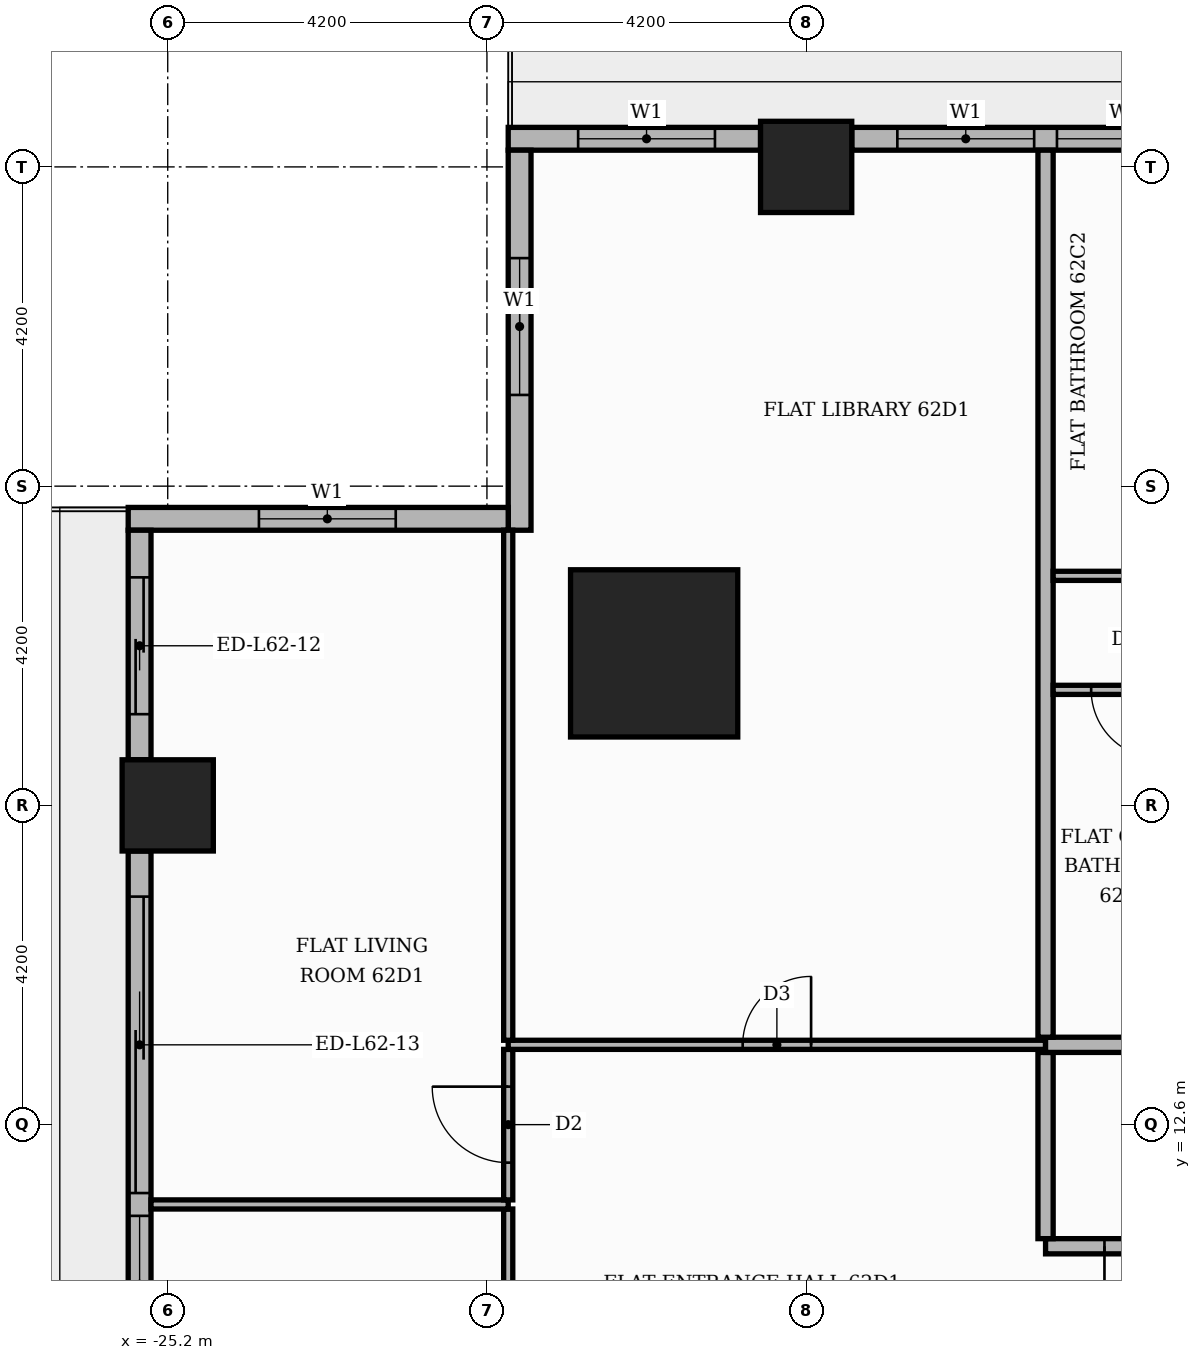
"""IFC4 building model, lengths in metres.
Left out: names, types, materials, properties, quantities, classifications, styles, units other than length and angle.
Written with IfcOpenShell. Run it as: python <this file> out.ifc"""

import sys

from ifc_helpers import new_model, si_unit, direction, frame, frame_2d, origin, origin_2d, place, context, subcontext, project, spatial, rectangle, extrude, element, fill, save


model = new_model("IFC4")
c1 = context("Model", 3, precision=1e-05, world=origin(), true_north=direction((0.0, 1.0)))
c2 = subcontext(c1, "Body", "Model", "MODEL_VIEW")
j1 = project(units=[si_unit("LENGTHUNIT", "METRE"), si_unit("PLANEANGLEUNIT", "RADIAN")], contexts=[c1])
p1 = place(None, origin())
s1 = spatial("IfcSite", under=j1, at=p1, CompositionType="ELEMENT")
p2 = place(p1, origin())
s2 = spatial("IfcBuilding", under=s1, at=p2, CompositionType="ELEMENT")
p3 = place(p2, frame((0.0, 0.0, 260.1)))
s3 = spatial("IfcBuildingStorey", under=s2, at=p3, CompositionType="ELEMENT", Elevation=260.1)
p4 = place(p3, frame((-18.8, 18.8, 0.0), z_axis=(0.0, 0.0, 1.0), x_axis=(1.0, 0.0, 0.0)))
e1 = element("IfcColumn", 1, at=p4, inside=s3, PredefinedType="COLUMN", context=c2, shape_type="SweptSolid", body=[
    extrude(rectangle(XDim=2.2, YDim=2.2, at=origin_2d()), origin(), (0.0, 0.0, 1.0), 3.9),
])
for number, where, z_axis, x_axis in (
    (2, (-16.8, 25.2, 0.0), (0.0, 0.0, 1.0), (1.0, 0.0, 0.0)),
    (3, (-25.2, 16.8, 0.0), (0.0, 0.0, 1.0), (1.0, 0.0, 0.0)),
):
    element("IfcColumn", number, at=place(p3, frame(where, z_axis=z_axis, x_axis=x_axis)), inside=s3, PredefinedType="COLUMN", context=c2, shape_type="SweptSolid", body=[
        extrude(rectangle(XDim=1.2, YDim=1.2, at=origin_2d()), origin(), (0.0, 0.0, 1.0), 3.9),
    ])
p5 = place(p3, frame((-9.0, 25.57, 0.0), z_axis=(0.0, 0.0, 1.0), x_axis=(-1.0, 0.0, 0.0)))
e4 = element("IfcWall", 4, at=p5, inside=s3, PredefinedType="STANDARD", context=c2, shape_type="SweptSolid", body=[
    extrude(rectangle(XDim=7.2, YDim=0.3, at=frame_2d((3.6, 0.0))), origin(), (0.0, 0.0, 1.0), 3.48),
])
p6 = place(p5, frame((0.6, 0.0, 0.9)))
e5 = element("IfcOpeningElement", 5, at=p6, cuts=e4, PredefinedType="OPENING", context=c2, shape_type="SweptSolid", body=[
    extrude(rectangle(XDim=1.8, YDim=2.1, at=frame_2d((0.9, 1.05))), frame((0.0, 0.16, 0.0), z_axis=(0.0, -1.0, 0.0), x_axis=(1.0, 0.0, 0.0)), (0.0, 0.0, 1.0), 0.32),
])
p7 = place(p5, frame((2.7, 0.0, 0.9)))
e6 = element("IfcOpeningElement", 6, at=p7, cuts=e4, PredefinedType="OPENING", context=c2, shape_type="SweptSolid", body=[
    extrude(rectangle(XDim=1.8, YDim=2.1, at=frame_2d((0.9, 1.05))), frame((0.0, 0.16, 0.0), z_axis=(0.0, -1.0, 0.0), x_axis=(1.0, 0.0, 0.0)), (0.0, 0.0, 1.0), 0.32),
])
p8 = place(p5, frame((4.8, 0.0, 0.9)))
e7 = element("IfcOpeningElement", 7, at=p8, cuts=e4, PredefinedType="OPENING", context=c2, shape_type="SweptSolid", body=[
    extrude(rectangle(XDim=1.8, YDim=2.1, at=frame_2d((0.9, 1.05))), frame((0.0, 0.16, 0.0), z_axis=(0.0, -1.0, 0.0), x_axis=(1.0, 0.0, 0.0)), (0.0, 0.0, 1.0), 0.32),
])
p9 = place(p3, frame((-17.4, 25.57, 0.0), z_axis=(0.0, 0.0, 1.0), x_axis=(-1.0, 0.0, 0.0)))
e8 = element("IfcWall", 8, at=p9, inside=s3, PredefinedType="STANDARD", context=c2, shape_type="SweptSolid", body=[
    extrude(rectangle(XDim=3.32, YDim=0.3, at=frame_2d((1.66, 0.0))), origin(), (0.0, 0.0, 1.0), 3.48),
])
p10 = place(p9, frame((0.6, 0.0, 0.9)))
e9 = element("IfcOpeningElement", 9, at=p10, cuts=e8, PredefinedType="OPENING", context=c2, shape_type="SweptSolid", body=[
    extrude(rectangle(XDim=1.8, YDim=2.1, at=frame_2d((0.9, 1.05))), frame((0.0, 0.16, 0.0), z_axis=(0.0, -1.0, 0.0), x_axis=(1.0, 0.0, 0.0)), (0.0, 0.0, 1.0), 0.32),
])
p11 = place(p3, frame((-20.57, 25.42, 0.0), z_axis=(0.0, 0.0, 1.0), x_axis=(0.0, -1.0, 0.0)))
e10 = element("IfcWall", 10, at=p11, inside=s3, PredefinedType="STANDARD", context=c2, shape_type="SweptSolid", body=[
    extrude(rectangle(XDim=5.0, YDim=0.3, at=frame_2d((2.5, 0.0))), origin(), (0.0, 0.0, 1.0), 3.48),
])
p12 = place(p11, frame((1.42, 0.0, 0.9)))
e11 = element("IfcOpeningElement", 11, at=p12, cuts=e10, PredefinedType="OPENING", context=c2, shape_type="SweptSolid", body=[
    extrude(rectangle(XDim=1.8, YDim=2.1, at=frame_2d((0.9, 1.05))), frame((0.0, 0.16, 0.0), z_axis=(0.0, -1.0, 0.0), x_axis=(1.0, 0.0, 0.0)), (0.0, 0.0, 1.0), 0.32),
])
p13 = place(p3, frame((-20.72, 20.57, 0.0), z_axis=(0.0, 0.0, 1.0), x_axis=(-1.0, 0.0, 0.0)))
e12 = element("IfcWall", 12, at=p13, inside=s3, PredefinedType="STANDARD", context=c2, shape_type="SweptSolid", body=[
    extrude(rectangle(XDim=5.0, YDim=0.3, at=frame_2d((2.5, 0.0))), origin(), (0.0, 0.0, 1.0), 3.48),
])
p14 = place(p13, frame((1.48, 0.0, 0.9)))
e13 = element("IfcOpeningElement", 13, at=p14, cuts=e12, PredefinedType="OPENING", context=c2, shape_type="SweptSolid", body=[
    extrude(rectangle(XDim=1.8, YDim=2.1, at=frame_2d((0.9, 1.05))), frame((0.0, 0.16, 0.0), z_axis=(0.0, -1.0, 0.0), x_axis=(1.0, 0.0, 0.0)), (0.0, 0.0, 1.0), 0.32),
])
p15 = place(p3, frame((-25.57, 20.42, 0.0), z_axis=(0.0, 0.0, 1.0), x_axis=(0.0, -1.0, 0.0)))
e14 = element("IfcWall", 14, at=p15, inside=s3, PredefinedType="STANDARD", context=c2, shape_type="SweptSolid", body=[
    extrude(rectangle(XDim=3.02, YDim=0.3, at=frame_2d((1.51, 0.0))), origin(), (0.0, 0.0, 1.0), 3.48),
])
p16 = place(p15, frame((0.62, 0.0, 0.0)))
e15 = element("IfcOpeningElement", 15, at=p16, cuts=e14, PredefinedType="OPENING", context=c2, shape_type="SweptSolid", body=[
    extrude(rectangle(XDim=1.8, YDim=2.4, at=frame_2d((0.9, 1.2))), frame((0.0, 0.16, 0.0), z_axis=(0.0, -1.0, 0.0), x_axis=(1.0, 0.0, 0.0)), (0.0, 0.0, 1.0), 0.32),
])
p17 = place(p3, frame((-25.57, 16.2, 0.0), z_axis=(0.0, 0.0, 1.0), x_axis=(0.0, -1.0, 0.0)))
e16 = element("IfcWall", 16, at=p17, inside=s3, PredefinedType="STANDARD", context=c2, shape_type="SweptSolid", body=[
    extrude(rectangle(XDim=7.2, YDim=0.3, at=frame_2d((3.6, 0.0))), origin(), (0.0, 0.0, 1.0), 3.48),
])
p18 = place(p17, frame((0.6, 0.0, 0.0)))
e17 = element("IfcOpeningElement", 17, at=p18, cuts=e16, PredefinedType="OPENING", context=c2, shape_type="SweptSolid", body=[
    extrude(rectangle(XDim=3.9, YDim=2.4, at=frame_2d((1.95, 1.2))), frame((0.0, 0.16, 0.0), z_axis=(0.0, -1.0, 0.0), x_axis=(1.0, 0.0, 0.0)), (0.0, 0.0, 1.0), 0.32),
])
p19 = place(p17, frame((4.8, 0.0, 0.9)))
e18 = element("IfcOpeningElement", 18, at=p19, cuts=e16, PredefinedType="OPENING", context=c2, shape_type="SweptSolid", body=[
    extrude(rectangle(XDim=1.8, YDim=2.1, at=frame_2d((0.9, 1.05))), frame((0.0, 0.16, 0.0), z_axis=(0.0, -1.0, 0.0), x_axis=(1.0, 0.0, 0.0)), (0.0, 0.0, 1.0), 0.32),
])
p20 = place(p3, frame((-20.72, 7.41, 0.0), z_axis=(0.0, 0.0, 1.0), x_axis=(0.0, 1.0, 0.0)))
e19 = element("IfcWall", 19, at=p20, inside=s3, PredefinedType="PARTITIONING", context=c2, shape_type="SweptSolid", body=[
    extrude(rectangle(XDim=4.08, YDim=0.12, at=frame_2d((2.04, 0.0))), origin(), (0.0, 0.0, 1.0), 3.48),
])
p21 = place(p20, frame((1.59, 0.0, 0.0)))
e20 = element("IfcOpeningElement", 20, at=p21, cuts=e19, PredefinedType="OPENING", context=c2, shape_type="SweptSolid", body=[
    extrude(rectangle(XDim=0.9, YDim=2.1, at=frame_2d((0.45, 1.05))), frame((0.0, 0.07, 0.0), z_axis=(0.0, -1.0, 0.0), x_axis=(1.0, 0.0, 0.0)), (0.0, 0.0, 1.0), 0.14),
])
p22 = place(p3, frame((-13.65, 11.0, 0.0), z_axis=(0.0, 0.0, 1.0), x_axis=(1.0, 0.0, 0.0)))
e21 = element("IfcWall", 21, at=p22, inside=s3, PredefinedType="PARTITIONING", context=c2, shape_type="SweptSolid", body=[
    extrude(rectangle(XDim=2.65, YDim=0.2, at=frame_2d((1.325, 0.0))), origin(), (0.0, 0.0, 1.0), 3.48),
])
p23 = place(p22, frame((0.775, 0.0, 0.0)))
e22 = element("IfcOpeningElement", 22, at=p23, cuts=e21, PredefinedType="OPENING", context=c2, shape_type="SweptSolid", body=[
    extrude(rectangle(XDim=1.1, YDim=2.4, at=frame_2d((0.55, 1.2))), frame((0.0, 0.11, 0.0), z_axis=(0.0, -1.0, 0.0), x_axis=(1.0, 0.0, 0.0)), (0.0, 0.0, 1.0), 0.22),
])
p24 = place(p3, frame((-13.65, 11.1, 0.0), z_axis=(0.0, 0.0, 1.0), x_axis=(0.0, 1.0, 0.0)))
e23 = element("IfcWall", 23, at=p24, inside=s3, PredefinedType="PARTITIONING", context=c2, shape_type="SweptSolid", body=[
    extrude(rectangle(XDim=2.45, YDim=0.2, at=frame_2d((1.225, 0.0))), origin(), (0.0, 0.0, 1.0), 3.48),
])
p25 = place(p3, frame((-25.42, 11.55, 0.0), z_axis=(0.0, 0.0, 1.0), x_axis=(1.0, 0.0, 0.0)))
e24 = element("IfcWall", 24, at=p25, inside=s3, PredefinedType="PARTITIONING", context=c2, shape_type="SweptSolid", body=[
    extrude(rectangle(XDim=4.7, YDim=0.12, at=frame_2d((2.35, 0.0))), origin(), (0.0, 0.0, 1.0), 3.48),
])
p26 = place(p3, frame((-20.72, 11.61, 0.0), z_axis=(0.0, 0.0, 1.0), x_axis=(0.0, 1.0, 0.0)))
e25 = element("IfcWall", 25, at=p26, inside=s3, PredefinedType="PARTITIONING", context=c2, shape_type="SweptSolid", body=[
    extrude(rectangle(XDim=1.98, YDim=0.12, at=frame_2d((0.99, 0.0))), origin(), (0.0, 0.0, 1.0), 3.48),
])
p27 = place(p26, frame((0.49, 0.0, 0.0)))
e26 = element("IfcOpeningElement", 26, at=p27, cuts=e25, PredefinedType="OPENING", context=c2, shape_type="SweptSolid", body=[
    extrude(rectangle(XDim=1.0, YDim=2.1, at=frame_2d((0.5, 1.05))), frame((0.0, 0.07, 0.0), z_axis=(0.0, -1.0, 0.0), x_axis=(1.0, 0.0, 0.0)), (0.0, 0.0, 1.0), 0.14),
])
p28 = place(p3, frame((-20.72, 13.65, 0.0), z_axis=(0.0, 0.0, 1.0), x_axis=(1.0, 0.0, 0.0)))
e27 = element("IfcWall", 27, at=p28, inside=s3, PredefinedType="PARTITIONING", context=c2, shape_type="SweptSolid", body=[
    extrude(rectangle(XDim=7.07, YDim=0.12, at=frame_2d((3.535, 0.0))), origin(), (0.0, 0.0, 1.0), 3.48),
])
p29 = place(p28, frame((3.085, 0.0, 0.0)))
e28 = element("IfcOpeningElement", 28, at=p29, cuts=e27, PredefinedType="OPENING", context=c2, shape_type="SweptSolid", body=[
    extrude(rectangle(XDim=0.9, YDim=2.1, at=frame_2d((0.45, 1.05))), frame((0.0, 0.07, 0.0), z_axis=(0.0, -1.0, 0.0), x_axis=(1.0, 0.0, 0.0)), (0.0, 0.0, 1.0), 0.14),
])
p30 = place(p3, frame((-13.65, 13.65, 0.0), z_axis=(0.0, 0.0, 1.0), x_axis=(1.0, 0.0, 0.0)))
e29 = element("IfcWall", 29, at=p30, inside=s3, PredefinedType="PARTITIONING", context=c2, shape_type="SweptSolid", body=[
    extrude(rectangle(XDim=39.07, YDim=0.2, at=frame_2d((19.535, 0.0))), origin(), (0.0, 0.0, 1.0), 3.48),
])
p31 = place(p30, frame((24.65, 0.0, 0.0)))
e30 = element("IfcOpeningElement", 30, at=p31, cuts=e29, PredefinedType="OPENING", context=c2, shape_type="SweptSolid", body=[
    extrude(rectangle(XDim=1.1, YDim=2.4, at=frame_2d((0.55, 1.2))), frame((0.0, 0.11, 0.0), z_axis=(0.0, -1.0, 0.0), x_axis=(1.0, 0.0, 0.0)), (0.0, 0.0, 1.0), 0.22),
])
p32 = place(p30, frame((14.15, 0.0, 0.0)))
e31 = element("IfcOpeningElement", 31, at=p32, cuts=e29, PredefinedType="OPENING", context=c2, shape_type="SweptSolid", body=[
    extrude(rectangle(XDim=1.1, YDim=2.4, at=frame_2d((0.55, 1.2))), frame((0.0, 0.11, 0.0), z_axis=(0.0, -1.0, 0.0), x_axis=(1.0, 0.0, 0.0)), (0.0, 0.0, 1.0), 0.22),
])
p33 = place(p3, frame((-20.72, 13.71, 0.0), z_axis=(0.0, 0.0, 1.0), x_axis=(0.0, 1.0, 0.0)))
e32 = element("IfcWall", 32, at=p33, inside=s3, PredefinedType="PARTITIONING", context=c2, shape_type="SweptSolid", body=[
    extrude(rectangle(XDim=6.71, YDim=0.12, at=frame_2d((3.355, 0.0))), origin(), (0.0, 0.0, 1.0), 3.48),
])
p34 = place(p3, frame((-13.65, 13.75, 0.0), z_axis=(0.0, 0.0, 1.0), x_axis=(0.0, 1.0, 0.0)))
e33 = element("IfcWall", 33, at=p34, inside=s3, PredefinedType="PARTITIONING", context=c2, shape_type="SweptSolid", body=[
    extrude(rectangle(XDim=11.67, YDim=0.2, at=frame_2d((5.835, 0.0))), origin(), (0.0, 0.0, 1.0), 3.48),
])
p35 = place(p3, frame((-13.55, 18.32, 0.0), z_axis=(0.0, 0.0, 1.0), x_axis=(1.0, 0.0, 0.0)))
e34 = element("IfcWall", 34, at=p35, inside=s3, PredefinedType="PARTITIONING", context=c2, shape_type="SweptSolid", body=[
    extrude(rectangle(XDim=12.5, YDim=0.12, at=frame_2d((6.25, 0.0))), origin(), (0.0, 0.0, 1.0), 3.48),
])
p36 = place(p35, frame((8.825, 0.0, 0.0)))
e35 = element("IfcOpeningElement", 35, at=p36, cuts=e34, PredefinedType="OPENING", context=c2, shape_type="SweptSolid", body=[
    extrude(rectangle(XDim=0.9, YDim=2.1, at=frame_2d((0.45, 1.05))), frame((0.0, 0.07, 0.0), z_axis=(0.0, -1.0, 0.0), x_axis=(1.0, 0.0, 0.0)), (0.0, 0.0, 1.0), 0.14),
])
p37 = place(p35, frame((4.7, 0.0, 0.0)))
e36 = element("IfcOpeningElement", 36, at=p37, cuts=e34, PredefinedType="OPENING", context=c2, shape_type="SweptSolid", body=[
    extrude(rectangle(XDim=0.9, YDim=2.1, at=frame_2d((0.45, 1.05))), frame((0.0, 0.07, 0.0), z_axis=(0.0, -1.0, 0.0), x_axis=(1.0, 0.0, 0.0)), (0.0, 0.0, 1.0), 0.14),
])
p38 = place(p35, frame((2.675, 0.0, 0.0)))
e37 = element("IfcOpeningElement", 37, at=p38, cuts=e34, PredefinedType="OPENING", context=c2, shape_type="SweptSolid", body=[
    extrude(rectangle(XDim=0.9, YDim=2.1, at=frame_2d((0.45, 1.05))), frame((0.0, 0.07, 0.0), z_axis=(0.0, -1.0, 0.0), x_axis=(1.0, 0.0, 0.0)), (0.0, 0.0, 1.0), 0.14),
])
p39 = place(p35, frame((0.5, 0.0, 0.0)))
e38 = element("IfcOpeningElement", 38, at=p39, cuts=e34, PredefinedType="OPENING", context=c2, shape_type="SweptSolid", body=[
    extrude(rectangle(XDim=0.9, YDim=2.1, at=frame_2d((0.45, 1.05))), frame((0.0, 0.07, 0.0), z_axis=(0.0, -1.0, 0.0), x_axis=(1.0, 0.0, 0.0)), (0.0, 0.0, 1.0), 0.14),
])
p40 = place(p3, frame((-13.55, 19.82, 0.0), z_axis=(0.0, 0.0, 1.0), x_axis=(1.0, 0.0, 0.0)))
e39 = element("IfcWall", 39, at=p40, inside=s3, PredefinedType="PARTITIONING", context=c2, shape_type="SweptSolid", body=[
    extrude(rectangle(XDim=18.7, YDim=0.12, at=frame_2d((9.35, 0.0))), origin(), (0.0, 0.0, 1.0), 3.48),
])
p41 = place(p40, frame((16.2, 0.0, 0.0)))
e40 = element("IfcOpeningElement", 40, at=p41, cuts=e39, PredefinedType="OPENING", context=c2, shape_type="SweptSolid", body=[
    extrude(rectangle(XDim=1.0, YDim=2.1, at=frame_2d((0.5, 1.05))), frame((0.0, 0.07, 0.0), z_axis=(0.0, -1.0, 0.0), x_axis=(1.0, 0.0, 0.0)), (0.0, 0.0, 1.0), 0.14),
])
p42 = place(p40, frame((12.05, 0.0, 0.0)))
e41 = element("IfcOpeningElement", 41, at=p42, cuts=e39, PredefinedType="OPENING", context=c2, shape_type="SweptSolid", body=[
    extrude(rectangle(XDim=0.9, YDim=2.1, at=frame_2d((0.45, 1.05))), frame((0.0, 0.07, 0.0), z_axis=(0.0, -1.0, 0.0), x_axis=(1.0, 0.0, 0.0)), (0.0, 0.0, 1.0), 0.14),
])
p43 = place(p40, frame((3.65, 0.0, 0.0)))
e42 = element("IfcOpeningElement", 42, at=p43, cuts=e39, PredefinedType="OPENING", context=c2, shape_type="SweptSolid", body=[
    extrude(rectangle(XDim=0.9, YDim=2.1, at=frame_2d((0.45, 1.05))), frame((0.0, 0.07, 0.0), z_axis=(0.0, -1.0, 0.0), x_axis=(1.0, 0.0, 0.0)), (0.0, 0.0, 1.0), 0.14),
])
p44 = place(p7, origin())
e43 = element("IfcWindow", 43, at=p44, inside=s3, PartitioningType="SINGLE_PANEL", PredefinedType="WINDOW", context=c2, shape_type="SweptSolid", body=[
    extrude(rectangle(XDim=1.8, YDim=2.1, at=frame_2d((0.9, 1.05))), frame((0.0, 0.03, 0.0), z_axis=(0.0, -1.0, 0.0), x_axis=(1.0, 0.0, 0.0)), (0.0, 0.0, 1.0), 0.06),
])
fill(e6, e43)
p45 = place(p8, origin())
e44 = element("IfcWindow", 44, at=p45, inside=s3, PartitioningType="SINGLE_PANEL", PredefinedType="WINDOW", context=c2, shape_type="SweptSolid", body=[
    extrude(rectangle(XDim=1.8, YDim=2.1, at=frame_2d((0.9, 1.05))), frame((0.0, 0.03, 0.0), z_axis=(0.0, -1.0, 0.0), x_axis=(1.0, 0.0, 0.0)), (0.0, 0.0, 1.0), 0.06),
])
fill(e7, e44)
p46 = place(p10, origin())
e45 = element("IfcWindow", 45, at=p46, inside=s3, PartitioningType="SINGLE_PANEL", PredefinedType="WINDOW", context=c2, shape_type="SweptSolid", body=[
    extrude(rectangle(XDim=1.8, YDim=2.1, at=frame_2d((0.9, 1.05))), frame((0.0, 0.03, 0.0), z_axis=(0.0, -1.0, 0.0), x_axis=(1.0, 0.0, 0.0)), (0.0, 0.0, 1.0), 0.06),
])
fill(e9, e45)
p47 = place(p12, origin())
e46 = element("IfcWindow", 46, at=p47, inside=s3, PartitioningType="SINGLE_PANEL", PredefinedType="WINDOW", context=c2, shape_type="SweptSolid", body=[
    extrude(rectangle(XDim=1.8, YDim=2.1, at=frame_2d((0.9, 1.05))), frame((0.0, 0.03, 0.0), z_axis=(0.0, -1.0, 0.0), x_axis=(1.0, 0.0, 0.0)), (0.0, 0.0, 1.0), 0.06),
])
fill(e11, e46)
p48 = place(p14, origin())
e47 = element("IfcWindow", 47, at=p48, inside=s3, PartitioningType="SINGLE_PANEL", PredefinedType="WINDOW", context=c2, shape_type="SweptSolid", body=[
    extrude(rectangle(XDim=1.8, YDim=2.1, at=frame_2d((0.9, 1.05))), frame((0.0, 0.03, 0.0), z_axis=(0.0, -1.0, 0.0), x_axis=(1.0, 0.0, 0.0)), (0.0, 0.0, 1.0), 0.06),
])
fill(e13, e47)
p49 = place(p16, origin())
e48 = element("IfcDoor", 48, at=p49, inside=s3, OperationType="SLIDING_TO_RIGHT", PredefinedType="DOOR", context=c2, shape_type="SweptSolid", body=[
    extrude(rectangle(XDim=1.8, YDim=2.4, at=frame_2d((0.9, 1.2))), frame((0.0, 0.025, 0.0), z_axis=(0.0, -1.0, 0.0), x_axis=(1.0, 0.0, 0.0)), (0.0, 0.0, 1.0), 0.05),
])
fill(e15, e48)
p50 = place(p18, origin())
e49 = element("IfcDoor", 49, at=p50, inside=s3, OperationType="SLIDING_TO_LEFT", PredefinedType="DOOR", context=c2, shape_type="SweptSolid", body=[
    extrude(rectangle(XDim=3.9, YDim=2.4, at=frame_2d((1.95, 1.2))), frame((0.0, 0.025, 0.0), z_axis=(0.0, -1.0, 0.0), x_axis=(1.0, 0.0, 0.0)), (0.0, 0.0, 1.0), 0.05),
])
fill(e17, e49)
p51 = place(p19, origin())
e50 = element("IfcWindow", 50, at=p51, inside=s3, PartitioningType="SINGLE_PANEL", PredefinedType="WINDOW", context=c2, shape_type="SweptSolid", body=[
    extrude(rectangle(XDim=1.8, YDim=2.1, at=frame_2d((0.9, 1.05))), frame((0.0, 0.03, 0.0), z_axis=(0.0, -1.0, 0.0), x_axis=(1.0, 0.0, 0.0)), (0.0, 0.0, 1.0), 0.06),
])
fill(e18, e50)
p52 = place(p39, frame((0.9, 0.0, 0.0), z_axis=(0.0, 0.0, 1.0), x_axis=(-1.0, 0.0, 0.0)))
e51 = element("IfcDoor", 51, at=p52, inside=s3, OperationType="SINGLE_SWING_RIGHT", PredefinedType="DOOR", context=c2, shape_type="SweptSolid", body=[
    extrude(rectangle(XDim=0.9, YDim=2.1, at=frame_2d((0.45, 1.05))), frame((0.0, 0.025, 0.0), z_axis=(0.0, -1.0, 0.0), x_axis=(1.0, 0.0, 0.0)), (0.0, 0.0, 1.0), 0.05),
])
fill(e38, e51)
p53 = place(p23, frame((1.1, 0.0, 0.0), z_axis=(0.0, 0.0, 1.0), x_axis=(-1.0, 0.0, 0.0)))
e52 = element("IfcDoor", 52, at=p53, inside=s3, OperationType="SINGLE_SWING_LEFT", PredefinedType="DOOR", context=c2, shape_type="SweptSolid", body=[
    extrude(rectangle(XDim=1.1, YDim=2.4, at=frame_2d((0.55, 1.2))), frame((0.0, 0.025, 0.0), z_axis=(0.0, -1.0, 0.0), x_axis=(1.0, 0.0, 0.0)), (0.0, 0.0, 1.0), 0.05),
])
fill(e22, e52)
p54 = place(p29, origin())
e53 = element("IfcDoor", 53, at=p54, inside=s3, OperationType="SINGLE_SWING_RIGHT", PredefinedType="DOOR", context=c2, shape_type="SweptSolid", body=[
    extrude(rectangle(XDim=0.9, YDim=2.1, at=frame_2d((0.45, 1.05))), frame((0.0, 0.025, 0.0), z_axis=(0.0, -1.0, 0.0), x_axis=(1.0, 0.0, 0.0)), (0.0, 0.0, 1.0), 0.05),
])
fill(e28, e53)
p55 = place(p27, origin())
e54 = element("IfcDoor", 54, at=p55, inside=s3, OperationType="SINGLE_SWING_RIGHT", PredefinedType="DOOR", context=c2, shape_type="SweptSolid", body=[
    extrude(rectangle(XDim=1.0, YDim=2.1, at=frame_2d((0.5, 1.05))), frame((0.0, 0.025, 0.0), z_axis=(0.0, -1.0, 0.0), x_axis=(1.0, 0.0, 0.0)), (0.0, 0.0, 1.0), 0.05),
])
fill(e26, e54)
save(model, sys.argv[1])
